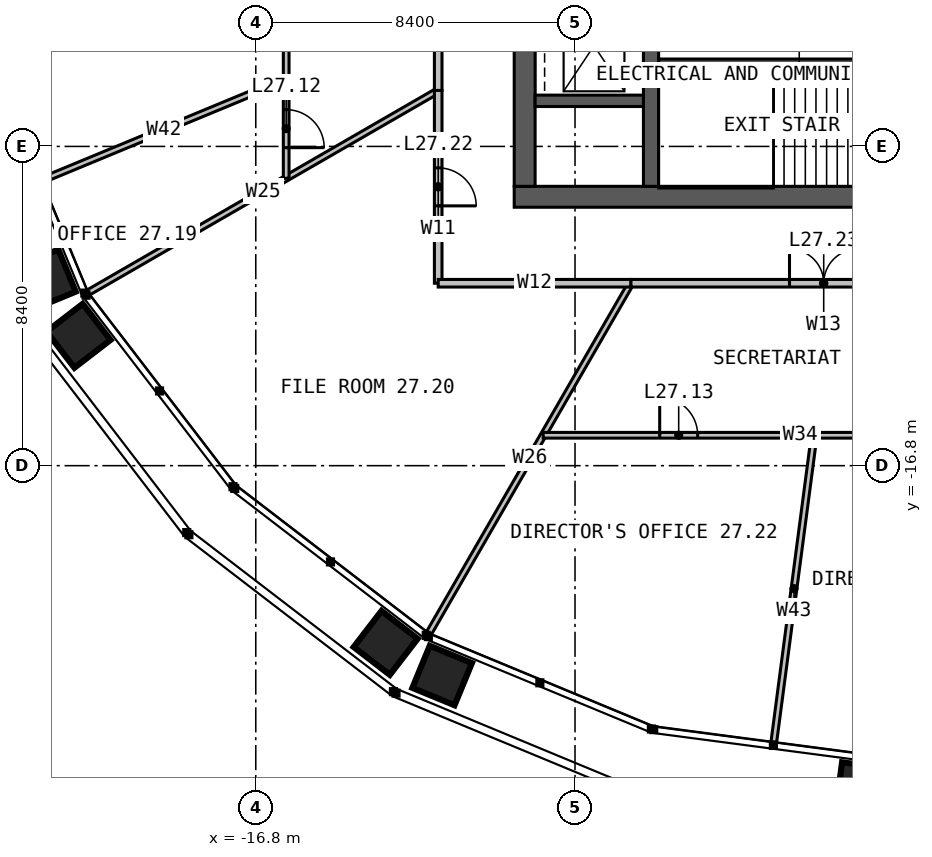
"""IFC4 building model, lengths in metres.
Left out: names, types, materials, properties, quantities, classifications, styles, units other than length and angle.
Written with IfcOpenShell. Run it as: python <this file> out.ifc"""

import sys

from ifc_helpers import new_model, si_unit, direction, frame, frame_2d, origin, place, context, subcontext, project, spatial, rectangle, extrude, element, fill, save


model = new_model("IFC4")
c1 = context("Model", 3, precision=1e-05, world=origin(), true_north=direction((0.0, 1.0)))
c2 = subcontext(c1, "Body", "Model", "MODEL_VIEW")
j1 = project(units=[si_unit("LENGTHUNIT", "METRE"), si_unit("PLANEANGLEUNIT", "RADIAN")], contexts=[c1])
p1 = place(None, origin())
s1 = spatial("IfcSite", under=j1, at=p1, CompositionType="ELEMENT")
p2 = place(p1, origin())
s2 = spatial("IfcBuilding", under=s1, at=p2, CompositionType="ELEMENT")
p3 = place(p2, frame((0.0, 0.0, 114.0)))
s3 = spatial("IfcBuildingStorey", under=s2, at=p3, CompositionType="ELEMENT", Elevation=114.0)
p4 = place(p3, frame((10.0, -9.725, 0.0), z_axis=(0.0, 0.0, 1.0), x_axis=(-1.0, 0.0, 0.0)))
e1 = element("IfcWall", 1, at=p4, inside=s3, PredefinedType="SOLIDWALL", context=c2, shape_type="SweptSolid", body=[
    extrude(rectangle(XDim=20.0, YDim=0.55, at=frame_2d((10.0, 0.0))), origin(), (0.0, 0.0, 1.0), 4.0),
])
p5 = place(p4, frame((6.875, 0.0, 0.0)))
e2 = element("IfcOpeningElement", 2, at=p5, cuts=e1, PredefinedType="OPENING", context=c2, shape_type="SweptSolid", body=[
    extrude(rectangle(XDim=1.2, YDim=2.2, at=frame_2d((0.6, 1.1))), frame((0.0, 0.285, 0.0), z_axis=(0.0, -1.0, 0.0), x_axis=(1.0, 0.0, 0.0)), (0.0, 0.0, 1.0), 0.57),
])
p6 = place(p3, frame((-9.725, 9.45, 0.0), z_axis=(0.0, 0.0, 1.0), x_axis=(0.0, -1.0, 0.0)))
e3 = element("IfcWall", 3, at=p6, inside=s3, PredefinedType="SOLIDWALL", context=c2, shape_type="SweptSolid", body=[
    extrude(rectangle(XDim=18.9, YDim=0.55, at=frame_2d((9.45, 0.0))), origin(), (0.0, 0.0, 1.0), 4.0),
])
p7 = place(p3, frame((-6.4, -9.45, 0.0), z_axis=(0.0, 0.0, 1.0), x_axis=(0.0, 1.0, 0.0)))
e4 = element("IfcWall", 4, at=p7, inside=s3, PredefinedType="SOLIDWALL", context=c2, shape_type="SweptSolid", body=[
    extrude(rectangle(XDim=18.9, YDim=0.4, at=frame_2d((9.45, 0.0))), origin(), (0.0, 0.0, 1.0), 4.0),
])
p8 = place(p7, frame((8.95, 0.0, 0.0)))
e5 = element("IfcOpeningElement", 5, at=p8, cuts=e4, PredefinedType="OPENING", context=c2, shape_type="SweptSolid", body=[
    extrude(rectangle(XDim=1.0, YDim=2.2, at=frame_2d((0.5, 1.1))), frame((0.0, 0.21, 0.0), z_axis=(0.0, -1.0, 0.0), x_axis=(1.0, 0.0, 0.0)), (0.0, 0.0, 1.0), 0.42),
])
p9 = place(p3, frame((-6.2, -6.2, 0.0), z_axis=(0.0, 0.0, 1.0), x_axis=(1.0, 0.0, 0.0)))
e6 = element("IfcWall", 6, at=p9, inside=s3, PredefinedType="SOLIDWALL", context=c2, shape_type="SweptSolid", body=[
    extrude(rectangle(XDim=7.4, YDim=0.2, at=frame_2d((3.7, 0.0))), origin(), (0.0, 0.0, 1.0), 4.0),
])
p10 = place(p3, frame((-9.45, -7.2, 0.0), z_axis=(0.0, 0.0, 1.0), x_axis=(1.0, 0.0, 0.0)))
e7 = element("IfcWall", 7, at=p10, inside=s3, PredefinedType="SOLIDWALL", context=c2, shape_type="SweptSolid", body=[
    extrude(rectangle(XDim=2.85, YDim=0.3, at=frame_2d((1.425, 0.0))), origin(), (0.0, 0.0, 1.0), 4.0),
])
for number, where, z_axis, x_axis in (
    (8, (-12.0, -6.928, 0.0), (0.0, 0.0, 1.0), (-0.866, -0.5, 0.0)),
    (9, (-6.928, -12.0, 0.0), (0.0, 0.0, 1.0), (-0.5, -0.866, 0.0)),
):
    element("IfcWall", number, at=place(p3, frame(where, z_axis=z_axis, x_axis=x_axis)), inside=s3, PredefinedType="PARTITIONING", context=c2, shape_type="SweptSolid", body=[
        extrude(rectangle(XDim=10.631, YDim=0.15, at=frame_2d((5.315, 0.0))), origin(), (0.0, 0.0, 1.0), 2.79),
    ])
p11 = place(p3, frame((-16.0, 9.238, 0.0), z_axis=(0.0, 0.0, 1.0), x_axis=(0.0, -1.0, 0.0)))
e10 = element("IfcWall", 10, at=p11, inside=s3, PredefinedType="PARTITIONING", context=c2, shape_type="SweptSolid", body=[
    extrude(rectangle(XDim=18.475, YDim=0.15, at=frame_2d((9.238, 0.0))), origin(), (0.0, 0.0, 1.0), 2.79),
])
p12 = place(p11, frame((0.805, 0.0, 0.0)))
e11 = element("IfcOpeningElement", 11, at=p12, cuts=e10, PredefinedType="OPENING", context=c2, shape_type="SweptSolid", body=[
    extrude(rectangle(XDim=1.0, YDim=2.2, at=frame_2d((0.5, 1.1))), frame((0.0, 0.085, 0.0), z_axis=(0.0, -1.0, 0.0), x_axis=(1.0, 0.0, 0.0)), (0.0, 0.0, 1.0), 0.17),
])
p13 = place(p11, frame((6.077, 0.0, 0.0)))
e12 = element("IfcOpeningElement", 12, at=p13, cuts=e10, PredefinedType="OPENING", context=c2, shape_type="SweptSolid", body=[
    extrude(rectangle(XDim=1.8, YDim=2.2, at=frame_2d((0.9, 1.1))), frame((0.0, 0.085, 0.0), z_axis=(0.0, -1.0, 0.0), x_axis=(1.0, 0.0, 0.0)), (0.0, 0.0, 1.0), 0.17),
])
p14 = place(p11, frame((13.104, 0.0, 0.0)))
e13 = element("IfcOpeningElement", 13, at=p14, cuts=e10, PredefinedType="OPENING", context=c2, shape_type="SweptSolid", body=[
    extrude(rectangle(XDim=1.0, YDim=2.2, at=frame_2d((0.5, 1.1))), frame((0.0, 0.085, 0.0), z_axis=(0.0, -1.0, 0.0), x_axis=(1.0, 0.0, 0.0)), (0.0, 0.0, 1.0), 0.17),
])
p15 = place(p11, frame((16.67, 0.0, 0.0)))
e14 = element("IfcOpeningElement", 14, at=p15, cuts=e10, PredefinedType="OPENING", context=c2, shape_type="SweptSolid", body=[
    extrude(rectangle(XDim=1.0, YDim=2.2, at=frame_2d((0.5, 1.1))), frame((0.0, 0.085, 0.0), z_axis=(0.0, -1.0, 0.0), x_axis=(1.0, 0.0, 0.0)), (0.0, 0.0, 1.0), 0.17),
])
p16 = place(p3, frame((-16.0, -6.627, 0.0), z_axis=(0.0, 0.0, 1.0), x_axis=(-0.923876163616, -0.382691565496, 0.0)))
e15 = element("IfcWall", 15, at=p16, inside=s3, PredefinedType="PARTITIONING", context=c2, shape_type="SweptSolid", body=[
    extrude(rectangle(XDim=6.959, YDim=0.15, at=frame_2d((3.48, 0.0))), origin(), (0.0, 0.0, 1.0), 2.79),
])
p17 = place(p3, frame((-12.0, 6.928, 0.0), z_axis=(0.0, 0.0, 1.0), x_axis=(0.0, -1.0, 0.0)))
e16 = element("IfcWall", 16, at=p17, inside=s3, PredefinedType="PARTITIONING", context=c2, shape_type="SweptSolid", body=[
    extrude(rectangle(XDim=13.856, YDim=0.2, at=frame_2d((6.928, 0.0))), origin(), (0.0, 0.0, 1.0), 3.8),
])
p18 = place(p17, frame((6.028, 0.0, 0.0)))
e17 = element("IfcOpeningElement", 17, at=p18, cuts=e16, PredefinedType="OPENING", context=c2, shape_type="SweptSolid", body=[
    extrude(rectangle(XDim=1.8, YDim=2.2, at=frame_2d((0.9, 1.1))), frame((0.0, 0.11, 0.0), z_axis=(0.0, -1.0, 0.0), x_axis=(1.0, 0.0, 0.0)), (0.0, 0.0, 1.0), 0.22),
])
p19 = place(p3, frame((-12.0, -6.928, 0.0), z_axis=(0.0, 0.0, 1.0), x_axis=(0.0, -1.0, 0.0)))
e18 = element("IfcWall", 18, at=p19, inside=s3, PredefinedType="PARTITIONING", context=c2, shape_type="SweptSolid", body=[
    extrude(rectangle(XDim=5.072, YDim=0.2, at=frame_2d((2.536, 0.0))), origin(), (0.0, 0.0, 1.0), 3.8),
])
p20 = place(p19, frame((2.036, 0.0, 0.0)))
e19 = element("IfcOpeningElement", 19, at=p20, cuts=e18, PredefinedType="OPENING", context=c2, shape_type="SweptSolid", body=[
    extrude(rectangle(XDim=1.0, YDim=2.2, at=frame_2d((0.5, 1.1))), frame((0.0, 0.11, 0.0), z_axis=(0.0, -1.0, 0.0), x_axis=(1.0, 0.0, 0.0)), (0.0, 0.0, 1.0), 0.22),
])
p21 = place(p3, frame((-12.0, -12.0, 0.0), z_axis=(0.0, 0.0, 1.0), x_axis=(1.0, 0.0, 0.0)))
e20 = element("IfcWall", 20, at=p21, inside=s3, PredefinedType="PARTITIONING", context=c2, shape_type="SweptSolid", body=[
    extrude(rectangle(XDim=5.072, YDim=0.2, at=frame_2d((2.536, 0.0))), origin(), (0.0, 0.0, 1.0), 3.8),
])
p22 = place(p3, frame((-9.238, -16.0, 0.0), z_axis=(0.0, 0.0, 1.0), x_axis=(1.0, 0.0, 0.0)))
e21 = element("IfcWall", 21, at=p22, inside=s3, PredefinedType="PARTITIONING", context=c2, shape_type="SweptSolid", body=[
    extrude(rectangle(XDim=13.525, YDim=0.15, at=frame_2d((6.762, 0.0))), origin(), (0.0, 0.0, 1.0), 2.79),
])
p23 = place(p22, frame((3.066, 0.0, 0.0)))
e22 = element("IfcOpeningElement", 22, at=p23, cuts=e21, PredefinedType="OPENING", context=c2, shape_type="SweptSolid", body=[
    extrude(rectangle(XDim=1.0, YDim=2.2, at=frame_2d((0.5, 1.1))), frame((0.0, 0.085, 0.0), z_axis=(0.0, -1.0, 0.0), x_axis=(1.0, 0.0, 0.0)), (0.0, 0.0, 1.0), 0.17),
])
p24 = place(p22, frame((9.828, 0.0, 0.0)))
e23 = element("IfcOpeningElement", 23, at=p24, cuts=e21, PredefinedType="OPENING", context=c2, shape_type="SweptSolid", body=[
    extrude(rectangle(XDim=1.0, YDim=2.2, at=frame_2d((0.5, 1.1))), frame((0.0, 0.085, 0.0), z_axis=(0.0, -1.0, 0.0), x_axis=(1.0, 0.0, 0.0)), (0.0, 0.0, 1.0), 0.17),
])
p25 = place(p3, frame((-2.106, -16.0, 0.0), z_axis=(0.0, 0.0, 1.0), x_axis=(-0.13053287573, -0.99144398145, 0.0)))
e24 = element("IfcWall", 24, at=p25, inside=s3, PredefinedType="PARTITIONING", context=c2, shape_type="SweptSolid", body=[
    extrude(rectangle(XDim=8.14, YDim=0.15, at=frame_2d((4.07, 0.0))), origin(), (0.0, 0.0, 1.0), 2.79),
])
p26 = place(p3, frame((-6.928, -12.0, 0.0), z_axis=(0.0, 0.0, 1.0), x_axis=(1.0, 0.0, 0.0)))
e25 = element("IfcWall", 25, at=p26, inside=s3, PredefinedType="PARTITIONING", context=c2, shape_type="SweptSolid", body=[
    extrude(rectangle(XDim=10.144, YDim=0.2, at=frame_2d((5.072, 0.0))), origin(), (0.0, 0.0, 1.0), 3.8),
])
p27 = place(p26, frame((4.172, 0.0, 0.0)))
e26 = element("IfcOpeningElement", 26, at=p27, cuts=e25, PredefinedType="OPENING", context=c2, shape_type="SweptSolid", body=[
    extrude(rectangle(XDim=1.8, YDim=2.2, at=frame_2d((0.9, 1.1))), frame((0.0, 0.11, 0.0), z_axis=(0.0, -1.0, 0.0), x_axis=(1.0, 0.0, 0.0)), (0.0, 0.0, 1.0), 0.22),
])
p28 = place(p15, origin())
e27 = element("IfcDoor", 27, at=p28, inside=s3, OperationType="SINGLE_SWING_RIGHT", PredefinedType="DOOR", context=c2, shape_type="SweptSolid", body=[
    extrude(rectangle(XDim=1.0, YDim=2.2, at=frame_2d((0.5, 1.1))), frame((0.0, 0.025, 0.0), z_axis=(0.0, -1.0, 0.0), x_axis=(1.0, 0.0, 0.0)), (0.0, 0.0, 1.0), 0.05),
])
fill(e14, e27)
p29 = place(p20, origin())
e28 = element("IfcDoor", 28, at=p29, inside=s3, OperationType="SINGLE_SWING_RIGHT", PredefinedType="DOOR", context=c2, shape_type="SweptSolid", body=[
    extrude(rectangle(XDim=1.0, YDim=2.2, at=frame_2d((0.5, 1.1))), frame((0.0, 0.025, 0.0), z_axis=(0.0, -1.0, 0.0), x_axis=(1.0, 0.0, 0.0)), (0.0, 0.0, 1.0), 0.05),
])
fill(e19, e28)
p30 = place(p23, origin())
e29 = element("IfcDoor", 29, at=p30, inside=s3, OperationType="SINGLE_SWING_LEFT", PredefinedType="DOOR", context=c2, shape_type="SweptSolid", body=[
    extrude(rectangle(XDim=1.0, YDim=2.2, at=frame_2d((0.5, 1.1))), frame((0.0, 0.025, 0.0), z_axis=(0.0, -1.0, 0.0), x_axis=(1.0, 0.0, 0.0)), (0.0, 0.0, 1.0), 0.05),
])
fill(e22, e29)
p31 = place(p27, origin())
e30 = element("IfcDoor", 30, at=p31, inside=s3, OperationType="DOUBLE_DOOR_SINGLE_SWING", PredefinedType="DOOR", context=c2, shape_type="SweptSolid", body=[
    extrude(rectangle(XDim=1.8, YDim=2.2, at=frame_2d((0.9, 1.1))), frame((0.0, 0.025, 0.0), z_axis=(0.0, -1.0, 0.0), x_axis=(1.0, 0.0, 0.0)), (0.0, 0.0, 1.0), 0.05),
])
fill(e26, e30)
save(model, sys.argv[1])
